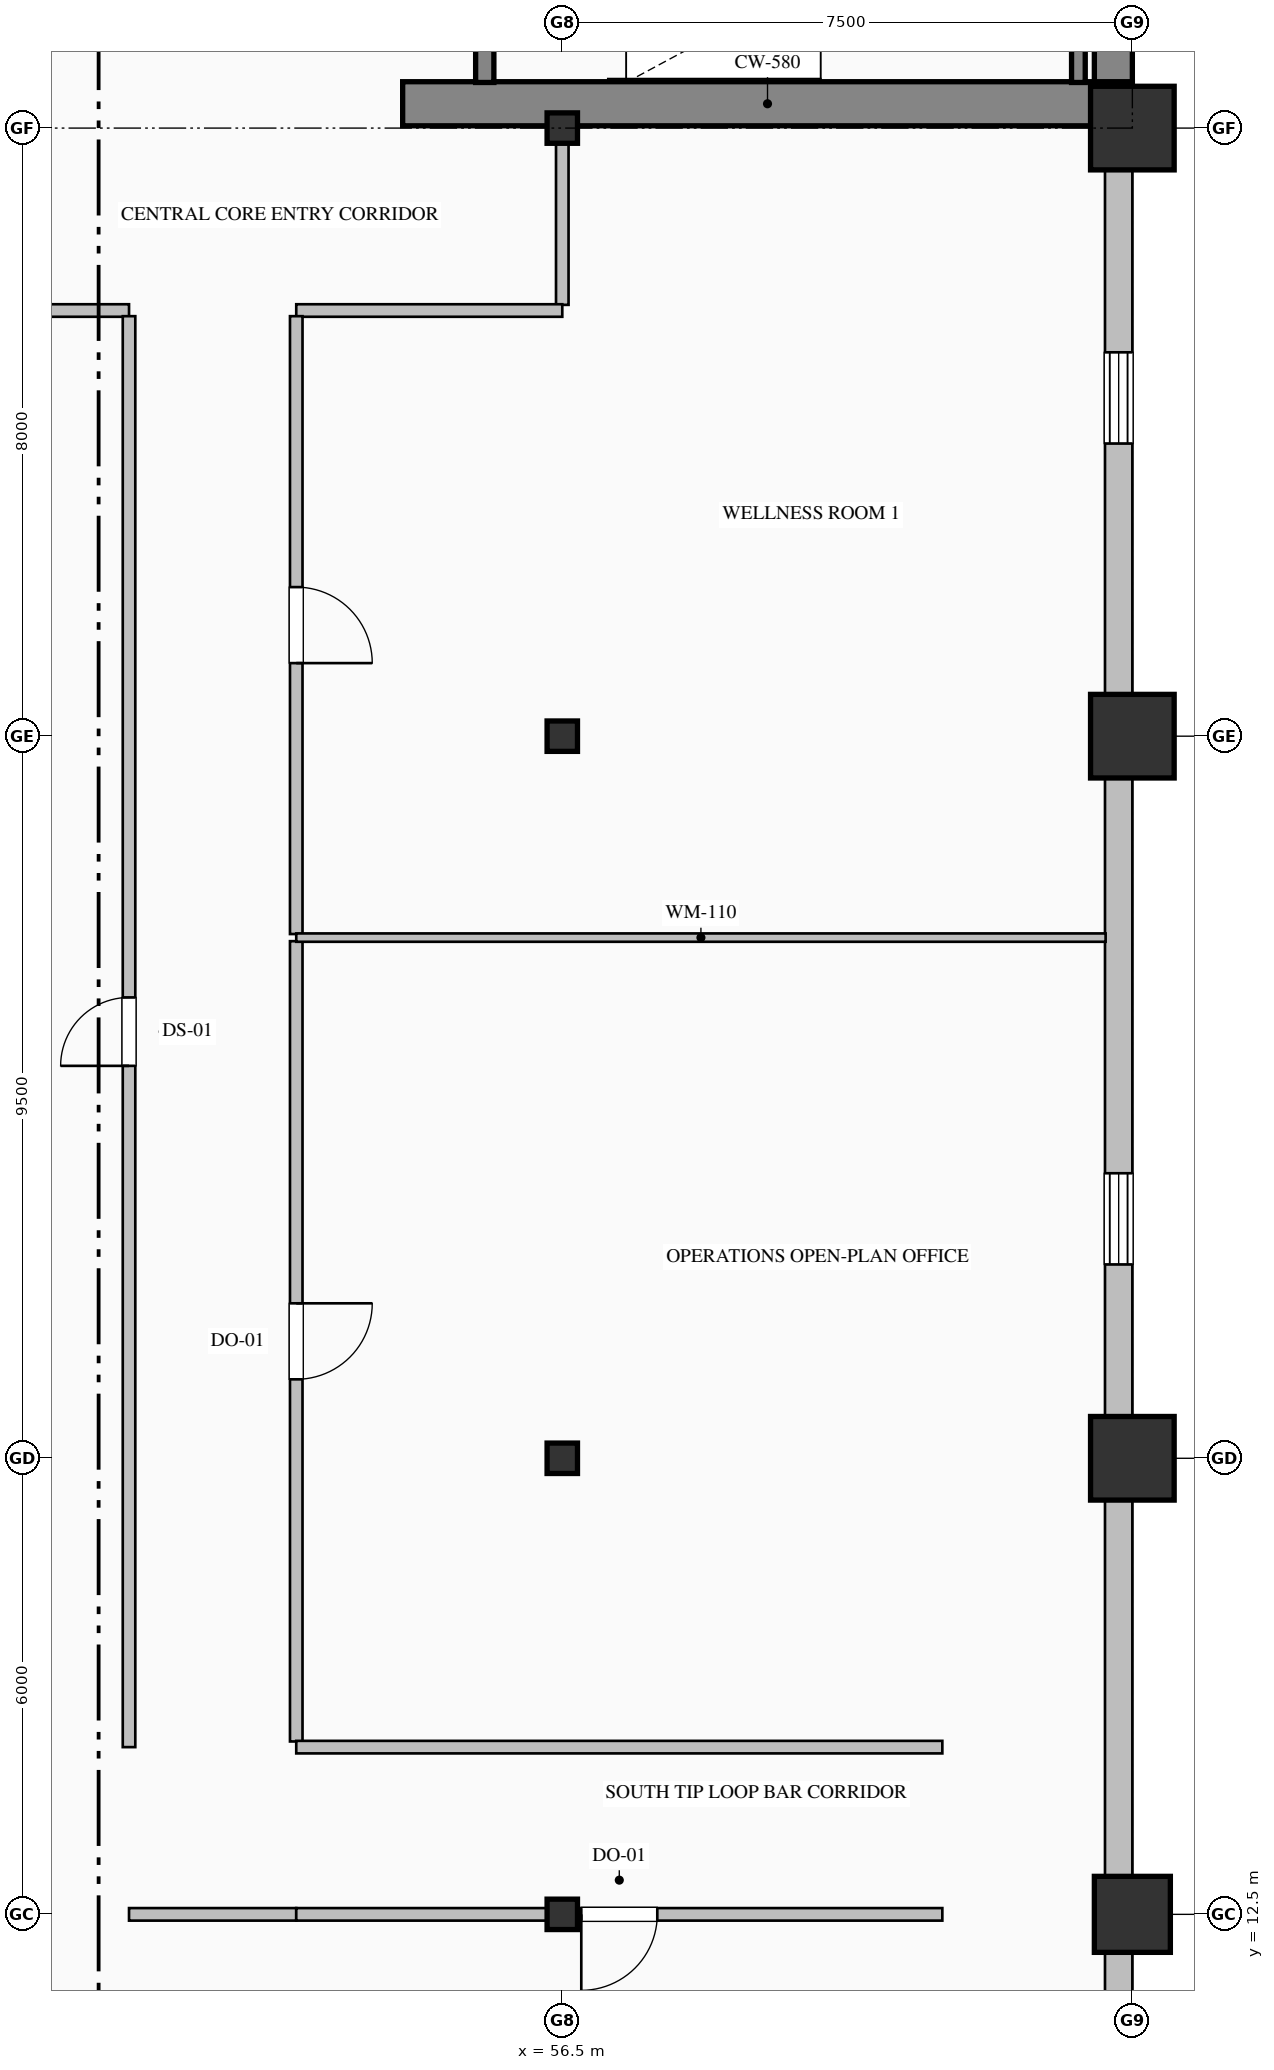
"""IFC4 building model, lengths in metres.
Left out: names, types, materials, properties, quantities, classifications, styles, units other than length and angle.
Written with IfcOpenShell. Run it as: python <this file> out.ifc"""

import sys

from ifc_helpers import new_model, si_unit, direction, frame, frame_2d, origin, origin_2d, place, context, subcontext, project, spatial, rectangle, hollow_rectangle, hollow_circle, i_section, extrude, element, fill, save


model = new_model("IFC4")
c1 = context("Model", 3, precision=1e-05, world=origin(), true_north=direction((0.0, 1.0)))
c2 = subcontext(c1, "Body", "Model", "MODEL_VIEW")
j1 = project(units=[si_unit("LENGTHUNIT", "METRE"), si_unit("PLANEANGLEUNIT", "RADIAN")], contexts=[c1])
p1 = place(None, origin())
s1 = spatial("IfcSite", under=j1, at=p1, CompositionType="ELEMENT")
p2 = place(p1, origin())
s2 = spatial("IfcBuilding", under=s1, at=p2, CompositionType="ELEMENT")
p3 = place(p2, frame((0.0, 0.0, 171.0)))
s3 = spatial("IfcBuildingStorey", under=s2, at=p3, CompositionType="ELEMENT", Elevation=171.0)
p4 = place(p3, frame((63.75, 36.32, 0.0), z_axis=(0.0, 0.0, 1.0), x_axis=(0.0, 1.0, 0.0)))
e1 = element("IfcWall", 1, at=p4, inside=s3, PredefinedType="SHEAR", context=c2, shape_type="SweptSolid", body=[
    extrude(rectangle(XDim=15.18, YDim=0.5, at=frame_2d((7.59, 0.0))), origin(), (0.0, 0.0, 1.0), 3.765),
])
p5 = place(p3, frame((54.4, 36.32, 0.0), z_axis=(0.0, 0.0, 1.0), x_axis=(1.0, 0.0, 0.0)))
e2 = element("IfcWall", 2, at=p5, inside=s3, PredefinedType="SHEAR", context=c2, shape_type="SweptSolid", body=[
    extrude(rectangle(XDim=9.6, YDim=0.58, at=frame_2d((4.8, 0.0))), origin(), (0.0, 0.0, 1.0), 4.0),
])
for number, where, z_axis, x_axis in (
    (3, (56.5, 12.5, 0.0), (0.0, 0.0, 1.0), (1.0, 0.0, 0.0)),
    (4, (56.5, 18.5, 0.0), (0.0, 0.0, 1.0), (1.0, 0.0, 0.0)),
    (5, (56.5, 28.0, 0.0), (0.0, 0.0, 1.0), (1.0, 0.0, 0.0)),
    (6, (56.5, 36.0, 0.0), (0.0, 0.0, 1.0), (1.0, 0.0, 0.0)),
):
    element("IfcColumn", number, at=place(p3, frame(where, z_axis=z_axis, x_axis=x_axis)), inside=s3, PredefinedType="COLUMN", context=c2, shape_type="SweptSolid", body=[
        extrude(i_section(OverallWidth=0.4, OverallDepth=0.4, WebThickness=0.013, FlangeThickness=0.021, FilletRadius=0.022, at=origin_2d()), origin(), (0.0, 0.0, 1.0), 4.0),
    ])
p6 = place(p3, frame((64.0, 12.5, 0.0), z_axis=(0.0, 0.0, 1.0), x_axis=(1.0, 0.0, 0.0)))
e7 = element("IfcColumn", 7, at=p6, inside=s3, PredefinedType="COLUMN", context=c2, shape_type="SweptSolid", body=[
    extrude(hollow_circle(Radius=0.5, WallThickness=0.036, at=origin_2d()), origin(), (0.0, 0.0, 1.0), 4.0),
])
for number, where, z_axis, x_axis in (
    (8, (64.0, 18.5, 0.0), (0.0, 0.0, 1.0), (1.0, 0.0, 0.0)),
    (9, (64.0, 28.0, 0.0), (0.0, 0.0, 1.0), (1.0, 0.0, 0.0)),
    (10, (64.0, 36.0, 0.0), (0.0, 0.0, 1.0), (1.0, 0.0, 0.0)),
):
    element("IfcColumn", number, at=place(p3, frame(where, z_axis=z_axis, x_axis=x_axis)), inside=s3, PredefinedType="COLUMN", context=c2, shape_type="SweptSolid", body=[
        extrude(hollow_rectangle(XDim=1.1, YDim=1.1, WallThickness=0.04, at=origin_2d()), origin(), (0.0, 0.0, 1.0), 4.0),
    ])
p7 = place(p3, frame((63.82, 36.05, 0.0), z_axis=(0.0, 0.0, 1.0), x_axis=(0.0, -1.0, 0.0)))
e11 = element("IfcWall", 11, at=p7, inside=s3, PredefinedType="SOLIDWALL", context=c2, shape_type="SweptSolid", body=[
    extrude(rectangle(XDim=28.05, YDim=0.36, at=frame_2d((14.025, 0.0))), origin(), (0.0, 0.0, 1.0), 3.265),
])
p8 = place(p7, frame((3.0, 0.0, 0.7)))
e12 = element("IfcOpeningElement", 12, at=p8, cuts=e11, PredefinedType="OPENING", context=c2, shape_type="SweptSolid", body=[
    extrude(rectangle(XDim=1.2, YDim=1.85, at=frame_2d((0.6, 0.925))), frame((0.0, 0.19, 0.0), z_axis=(0.0, -1.0, 0.0), x_axis=(1.0, 0.0, 0.0)), (0.0, 0.0, 1.0), 0.38),
])
p9 = place(p7, frame((13.8, 0.0, 0.7)))
e13 = element("IfcOpeningElement", 13, at=p9, cuts=e11, PredefinedType="OPENING", context=c2, shape_type="SweptSolid", body=[
    extrude(rectangle(XDim=1.2, YDim=1.85, at=frame_2d((0.6, 0.925))), frame((0.0, 0.19, 0.0), z_axis=(0.0, -1.0, 0.0), x_axis=(1.0, 0.0, 0.0)), (0.0, 0.0, 1.0), 0.38),
])
p10 = place(p7, frame((24.6, 0.0, 0.7)))
e14 = element("IfcOpeningElement", 14, at=p10, cuts=e11, PredefinedType="OPENING", context=c2, shape_type="SweptSolid", body=[
    extrude(rectangle(XDim=1.2, YDim=1.85, at=frame_2d((0.6, 0.925))), frame((0.0, 0.19, 0.0), z_axis=(0.0, -1.0, 0.0), x_axis=(1.0, 0.0, 0.0)), (0.0, 0.0, 1.0), 0.38),
])
p11 = place(p3, frame((55.48, 39.75, 0.0), z_axis=(0.0, 0.0, 1.0), x_axis=(0.0, -1.0, 0.0)))
e15 = element("IfcWall", 15, at=p11, inside=s3, PredefinedType="SOLIDWALL", context=c2, shape_type="SweptSolid", body=[
    extrude(rectangle(XDim=3.15, YDim=0.24, at=frame_2d((1.575, 0.0))), origin(), (0.0, 0.0, 1.0), 4.0),
])
p12 = place(p11, frame((1.0, 0.0, 0.0)))
e16 = element("IfcOpeningElement", 16, at=p12, cuts=e15, PredefinedType="OPENING", context=c2, shape_type="SweptSolid", body=[
    extrude(rectangle(XDim=1.15, YDim=2.2, at=frame_2d((0.575, 1.1))), frame((0.0, 0.13, 0.0), z_axis=(0.0, -1.0, 0.0), x_axis=(1.0, 0.0, 0.0)), (0.0, 0.0, 1.0), 0.26),
])
p13 = place(p3, frame((63.29, 36.6, 0.0), z_axis=(0.0, 0.0, 1.0), x_axis=(0.0, 1.0, 0.0)))
e17 = element("IfcWall", 17, at=p13, inside=s3, PredefinedType="SOLIDWALL", context=c2, shape_type="SweptSolid", body=[
    extrude(rectangle(XDim=3.15, YDim=0.18, at=frame_2d((1.575, 0.0))), origin(), (0.0, 0.0, 1.0), 4.0),
])
p14 = place(p3, frame((56.5, 36.0, 0.0), z_axis=(0.0, 0.0, 1.0), x_axis=(0.0, -1.0, 0.0)))
e18 = element("IfcWall", 18, at=p14, inside=s3, PredefinedType="PARTITIONING", context=c2, shape_type="SweptSolid", body=[
    extrude(rectangle(XDim=2.325, YDim=0.165, at=frame_2d((1.163, 0.0))), origin(), (0.0, 0.0, 1.0), 3.157),
])
p15 = place(p3, frame((56.5, 33.6, 0.0), z_axis=(0.0, 0.0, 1.0), x_axis=(-1.0, 0.0, 0.0)))
e19 = element("IfcWall", 19, at=p15, inside=s3, PredefinedType="PARTITIONING", context=c2, shape_type="SweptSolid", body=[
    extrude(rectangle(XDim=3.5, YDim=0.165, at=frame_2d((1.75, 0.0))), origin(), (0.0, 0.0, 1.0), 3.765),
])
p16 = place(p3, frame((50.8, 33.6, 0.0), z_axis=(0.0, 0.0, 1.0), x_axis=(-1.0, 0.0, 0.0)))
e20 = element("IfcWall", 20, at=p16, inside=s3, PredefinedType="PARTITIONING", context=c2, shape_type="SweptSolid", body=[
    extrude(rectangle(XDim=10.3, YDim=0.165, at=frame_2d((5.15, 0.0))), origin(), (0.0, 0.0, 1.0), 3.765),
])
p17 = place(p3, frame((53.0, 12.5, 0.0), z_axis=(0.0, 0.0, 1.0), x_axis=(-1.0, 0.0, 0.0)))
e21 = element("IfcWall", 21, at=p17, inside=s3, PredefinedType="PARTITIONING", context=c2, shape_type="SweptSolid", body=[
    extrude(rectangle(XDim=2.2, YDim=0.165, at=frame_2d((1.1, 0.0))), origin(), (0.0, 0.0, 1.0), 3.157),
])
p18 = place(p3, frame((53.0, 25.303, 0.0), z_axis=(0.0, 0.0, 1.0), x_axis=(0.0, -1.0, 0.0)))
e22 = element("IfcWall", 22, at=p18, inside=s3, PredefinedType="PARTITIONING", context=c2, shape_type="SweptSolid", body=[
    extrude(rectangle(XDim=10.529, YDim=0.165, at=frame_2d((5.264, 0.0))), origin(), (0.0, 0.0, 1.0), 3.765),
])
p19 = place(p18, frame((4.764, 0.0, 0.0)))
e23 = element("IfcOpeningElement", 23, at=p19, cuts=e22, PredefinedType="OPENING", context=c2, shape_type="SweptSolid", body=[
    extrude(rectangle(XDim=1.0, YDim=2.15, at=frame_2d((0.5, 1.075))), frame((0.0, 0.093, 0.0), z_axis=(0.0, -1.0, 0.0), x_axis=(1.0, 0.0, 0.0)), (0.0, 0.0, 1.0), 0.185),
])
p20 = place(p3, frame((53.0, 33.525, 0.0), z_axis=(0.0, 0.0, 1.0), x_axis=(0.0, -1.0, 0.0)))
e24 = element("IfcWall", 24, at=p20, inside=s3, PredefinedType="PARTITIONING", context=c2, shape_type="SweptSolid", body=[
    extrude(rectangle(XDim=8.128, YDim=0.165, at=frame_2d((4.064, 0.0))), origin(), (0.0, 0.0, 1.0), 3.765),
])
p21 = place(p20, frame((3.564, 0.0, 0.0)))
e25 = element("IfcOpeningElement", 25, at=p21, cuts=e24, PredefinedType="OPENING", context=c2, shape_type="SweptSolid", body=[
    extrude(rectangle(XDim=1.0, YDim=2.15, at=frame_2d((0.5, 1.075))), frame((0.0, 0.093, 0.0), z_axis=(0.0, -1.0, 0.0), x_axis=(1.0, 0.0, 0.0)), (0.0, 0.0, 1.0), 0.185),
])
p22 = place(p3, frame((50.8, 14.7, 0.0), z_axis=(0.0, 0.0, 1.0), x_axis=(0.0, 1.0, 0.0)))
e26 = element("IfcWall", 26, at=p22, inside=s3, PredefinedType="PARTITIONING", context=c2, shape_type="SweptSolid", body=[
    extrude(rectangle(XDim=18.825, YDim=0.165, at=frame_2d((9.413, 0.0))), origin(), (0.0, 0.0, 1.0), 3.765),
])
p23 = place(p22, frame((8.963, 0.0, 0.0)))
e27 = element("IfcOpeningElement", 27, at=p23, cuts=e26, PredefinedType="OPENING", context=c2, shape_type="SweptSolid", body=[
    extrude(rectangle(XDim=0.9, YDim=2.15, at=frame_2d((0.45, 1.075))), frame((0.0, 0.093, 0.0), z_axis=(0.0, -1.0, 0.0), x_axis=(1.0, 0.0, 0.0)), (0.0, 0.0, 1.0), 0.185),
])
p24 = place(p3, frame((61.5, 12.5, 0.0), z_axis=(0.0, 0.0, 1.0), x_axis=(-1.0, 0.0, 0.0)))
e28 = element("IfcWall", 28, at=p24, inside=s3, PredefinedType="PARTITIONING", context=c2, shape_type="SweptSolid", body=[
    extrude(rectangle(XDim=8.5, YDim=0.165, at=frame_2d((4.25, 0.0))), origin(), (0.0, 0.0, 1.0), 3.157),
])
p25 = place(p24, frame((3.75, 0.0, 0.0)))
e29 = element("IfcOpeningElement", 29, at=p25, cuts=e28, PredefinedType="OPENING", context=c2, shape_type="SweptSolid", body=[
    extrude(rectangle(XDim=1.0, YDim=2.15, at=frame_2d((0.5, 1.075))), frame((0.0, 0.093, 0.0), z_axis=(0.0, -1.0, 0.0), x_axis=(1.0, 0.0, 0.0)), (0.0, 0.0, 1.0), 0.185),
])
p26 = place(p3, frame((53.0, 14.7, 0.0), z_axis=(0.0, 0.0, 1.0), x_axis=(1.0, 0.0, 0.0)))
e30 = element("IfcWall", 30, at=p26, inside=s3, PredefinedType="PARTITIONING", context=c2, shape_type="SweptSolid", body=[
    extrude(rectangle(XDim=8.5, YDim=0.165, at=frame_2d((4.25, 0.0))), origin(), (0.0, 0.0, 1.0), 3.765),
])
p27 = place(p3, frame((53.0, 25.35, 0.0), z_axis=(0.0, 0.0, 1.0), x_axis=(1.0, 0.0, 0.0)))
e31 = element("IfcWall", 31, at=p27, inside=s3, PredefinedType="MOVABLE", context=c2, shape_type="SweptSolid", body=[
    extrude(rectangle(XDim=10.648, YDim=0.11, at=frame_2d((5.324, 0.0))), origin(), (0.0, 0.0, 1.0), 3.765),
])
p28 = place(p8, origin())
e32 = element("IfcWindow", 32, at=p28, inside=s3, PartitioningType="DOUBLE_PANEL_VERTICAL", PredefinedType="WINDOW", context=c2, shape_type="SweptSolid", body=[
    extrude(rectangle(XDim=1.2, YDim=1.85, at=frame_2d((0.6, 0.925))), frame((0.0, 0.15, 0.0), z_axis=(0.0, -1.0, 0.0), x_axis=(1.0, 0.0, 0.0)), (0.0, 0.0, 1.0), 0.06),
])
fill(e12, e32)
p29 = place(p9, origin())
e33 = element("IfcWindow", 33, at=p29, inside=s3, PartitioningType="DOUBLE_PANEL_VERTICAL", PredefinedType="WINDOW", context=c2, shape_type="SweptSolid", body=[
    extrude(rectangle(XDim=1.2, YDim=1.85, at=frame_2d((0.6, 0.925))), frame((0.0, 0.15, 0.0), z_axis=(0.0, -1.0, 0.0), x_axis=(1.0, 0.0, 0.0)), (0.0, 0.0, 1.0), 0.06),
])
fill(e13, e33)
p30 = place(p25, origin())
e34 = element("IfcDoor", 34, at=p30, inside=s3, OperationType="SINGLE_SWING_RIGHT", PredefinedType="DOOR", context=c2, shape_type="SweptSolid", body=[
    extrude(rectangle(XDim=1.0, YDim=2.15, at=frame_2d((0.5, 1.075))), frame((0.0, 0.025, 0.0), z_axis=(0.0, -1.0, 0.0), x_axis=(1.0, 0.0, 0.0)), (0.0, 0.0, 1.0), 0.05),
])
fill(e29, e34)
p31 = place(p19, origin())
e35 = element("IfcDoor", 35, at=p31, inside=s3, OperationType="SINGLE_SWING_LEFT", PredefinedType="DOOR", context=c2, shape_type="SweptSolid", body=[
    extrude(rectangle(XDim=1.0, YDim=2.15, at=frame_2d((0.5, 1.075))), frame((0.0, 0.025, 0.0), z_axis=(0.0, -1.0, 0.0), x_axis=(1.0, 0.0, 0.0)), (0.0, 0.0, 1.0), 0.05),
])
fill(e23, e35)
p32 = place(p21, origin())
e36 = element("IfcDoor", 36, at=p32, inside=s3, OperationType="SINGLE_SWING_RIGHT", PredefinedType="DOOR", context=c2, shape_type="SweptSolid", body=[
    extrude(rectangle(XDim=1.0, YDim=2.15, at=frame_2d((0.5, 1.075))), frame((0.0, 0.025, 0.0), z_axis=(0.0, -1.0, 0.0), x_axis=(1.0, 0.0, 0.0)), (0.0, 0.0, 1.0), 0.05),
])
fill(e25, e36)
p33 = place(p23, origin())
e37 = element("IfcDoor", 37, at=p33, inside=s3, OperationType="SINGLE_SWING_LEFT", PredefinedType="DOOR", context=c2, shape_type="SweptSolid", body=[
    extrude(rectangle(XDim=0.9, YDim=2.15, at=frame_2d((0.45, 1.075))), frame((0.0, 0.025, 0.0), z_axis=(0.0, -1.0, 0.0), x_axis=(1.0, 0.0, 0.0)), (0.0, 0.0, 1.0), 0.05),
])
fill(e27, e37)
save(model, sys.argv[1])
